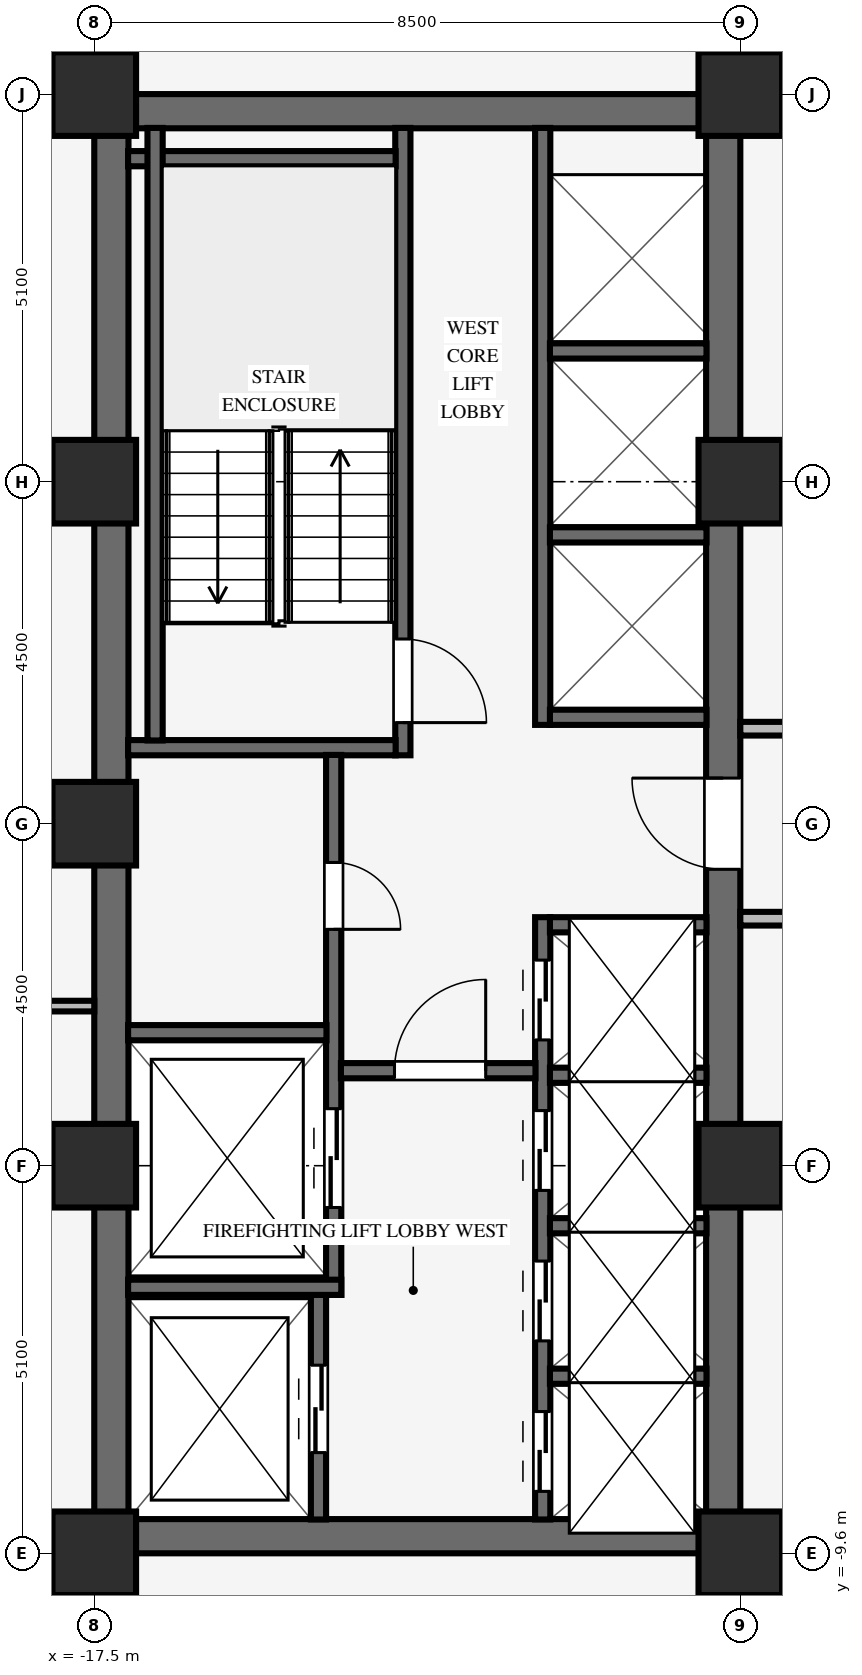
"""IFC4 building model, lengths in metres.
Left out: names, types, materials, properties, quantities, classifications, styles, units other than length and angle.
Written with IfcOpenShell. Run it as: python <this file> out.ifc"""

import sys

from ifc_helpers import new_model, si_unit, direction, frame, frame_2d, origin, origin_2d, place, context, subcontext, project, spatial, rectangle, extrude, source, transform, mapped, element, fill, save


model = new_model("IFC4")
c1 = context("Model", 3, precision=1e-05, world=origin(), true_north=direction((0.0, 1.0)))
c2 = subcontext(c1, "Body", "Model", "MODEL_VIEW")
j1 = project(units=[si_unit("LENGTHUNIT", "METRE"), si_unit("PLANEANGLEUNIT", "RADIAN")], contexts=[c1])
p1 = place(None, origin())
s1 = spatial("IfcSite", under=j1, at=p1, CompositionType="ELEMENT")
p2 = place(p1, origin())
s2 = spatial("IfcBuilding", under=s1, at=p2, CompositionType="ELEMENT")
p3 = place(p2, frame((0.0, 0.0, 75.05)))
s3 = spatial("IfcBuildingStorey", under=s2, at=p3, CompositionType="ELEMENT", Elevation=75.05)
for number, where, z_axis, x_axis in (
    (1, (-17.5, -9.375, 0.0), (0.0, 0.0, 1.0), (1.0, 0.0, 0.0)),
    (2, (-17.5, 9.375, 0.0), (0.0, 0.0, 1.0), (1.0, 0.0, 0.0)),
):
    element("IfcWall", number, at=place(p3, frame(where, z_axis=z_axis, x_axis=x_axis)), inside=s3, PredefinedType="SHEAR", context=c2, shape_type="SweptSolid", body=[
        extrude(rectangle(XDim=8.5, YDim=0.45, at=frame_2d((4.25, 0.0))), origin(), (0.0, 0.0, 1.0), 3.37),
    ])
p4 = place(p3, frame((-17.275, -9.155, 0.0), z_axis=(0.0, 0.0, 1.0), x_axis=(0.0, 1.0, 0.0)))
e3 = element("IfcWall", 3, at=p4, inside=s3, PredefinedType="SHEAR", context=c2, shape_type="SweptSolid", body=[
    extrude(rectangle(XDim=18.31, YDim=0.45, at=frame_2d((9.155, 0.0))), origin(), (0.0, 0.0, 1.0), 3.37),
])
p5 = place(p3, frame((-9.225, -9.155, 0.0), z_axis=(0.0, 0.0, 1.0), x_axis=(0.0, 1.0, 0.0)))
e4 = element("IfcWall", 4, at=p5, inside=s3, PredefinedType="SHEAR", context=c2, shape_type="SweptSolid", body=[
    extrude(rectangle(XDim=18.31, YDim=0.45, at=frame_2d((9.155, 0.0))), origin(), (0.0, 0.0, 1.0), 3.37),
])
p6 = place(p5, frame((8.555, 0.0, 0.0)))
e5 = element("IfcOpeningElement", 5, at=p6, cuts=e4, PredefinedType="OPENING", context=c2, shape_type="SweptSolid", body=[
    extrude(rectangle(XDim=1.2, YDim=2.15, at=frame_2d((0.6, 1.075))), frame((0.0, 0.235, 0.0), z_axis=(0.0, -1.0, 0.0), x_axis=(1.0, 0.0, 0.0)), (0.0, 0.0, 1.0), 0.47),
])
for number, where, z_axis, x_axis in (
    (6, (-17.5, -9.6, 0.0), (0.0, 0.0, 1.0), (1.0, 0.0, 0.0)),
    (7, (-17.5, -4.5, 0.0), (0.0, 0.0, 1.0), (1.0, 0.0, 0.0)),
    (8, (-17.5, 4.5, 0.0), (0.0, 0.0, 1.0), (1.0, 0.0, 0.0)),
    (9, (-17.5, 9.6, 0.0), (0.0, 0.0, 1.0), (1.0, 0.0, 0.0)),
    (10, (-9.0, -9.6, 0.0), (0.0, 0.0, 1.0), (1.0, 0.0, 0.0)),
    (11, (-9.0, -4.5, 0.0), (0.0, 0.0, 1.0), (1.0, 0.0, 0.0)),
    (12, (-9.0, 4.5, 0.0), (0.0, 0.0, 1.0), (1.0, 0.0, 0.0)),
    (13, (-9.0, 9.6, 0.0), (0.0, 0.0, 1.0), (1.0, 0.0, 0.0)),
    (14, (-17.5, 0.0, 0.0), (0.0, 0.0, 1.0), (1.0, 0.0, 0.0)),
):
    element("IfcColumn", number, at=place(p3, frame(where, z_axis=z_axis, x_axis=x_axis)), inside=s3, PredefinedType="COLUMN", context=c2, shape_type="SweptSolid", body=[
        extrude(rectangle(XDim=1.1, YDim=1.1, at=origin_2d()), origin(), (0.0, 0.0, 1.0), 3.37),
    ])
p7 = place(p3, frame((-13.44, 0.9, 0.0), z_axis=(0.0, 0.0, 1.0), x_axis=(0.0, 1.0, 0.0)))
e15 = element("IfcWall", 15, at=p7, inside=s3, PredefinedType="SHEAR", context=c2, shape_type="SweptSolid", body=[
    extrude(rectangle(XDim=8.255, YDim=0.2, at=frame_2d((4.127, 0.0))), origin(), (0.0, 0.0, 1.0), 3.37),
])
p8 = place(p7, frame((1.53, 0.0, 0.0), z_axis=(0.0, 0.0, 1.0), x_axis=(-1.0, 0.0, 0.0)))
e16 = element("IfcOpeningElement", 16, at=p8, cuts=e15, PredefinedType="OPENING", context=c2, shape_type="SweptSolid", body=[
    extrude(rectangle(XDim=1.1, YDim=2.15, at=frame_2d((0.55, 1.075))), frame((0.0, 0.11, 0.0), z_axis=(0.0, -1.0, 0.0), x_axis=(1.0, 0.0, 0.0)), (0.0, 0.0, 1.0), 0.22),
])
for number, where, z_axis, x_axis in (
    (17, (-17.055, 1.0, 0.0), (0.0, 0.0, 1.0), (1.0, 0.0, 0.0)),
    (18, (-17.055, 8.75, 0.0), (0.0, 0.0, 1.0), (1.0, 0.0, 0.0)),
):
    element("IfcWall", number, at=place(p3, frame(where, z_axis=z_axis, x_axis=x_axis)), inside=s3, PredefinedType="SHEAR", context=c2, shape_type="SweptSolid", body=[
        extrude(rectangle(XDim=3.52, YDim=0.2, at=frame_2d((1.76, 0.0))), origin(), (0.0, 0.0, 1.0), 3.37),
    ])
p9 = place(p3, frame((-16.7, 1.095, 0.0), z_axis=(0.0, 0.0, 1.0), x_axis=(0.0, 1.0, 0.0)))
e19 = element("IfcWall", 19, at=p9, inside=s3, PredefinedType="SHEAR", context=c2, shape_type="SweptSolid", body=[
    extrude(rectangle(XDim=8.06, YDim=0.2, at=frame_2d((4.03, 0.0))), origin(), (0.0, 0.0, 1.0), 3.37),
])
p10 = place(p3, frame((-14.55, -9.155, 0.0), z_axis=(0.0, 0.0, 1.0), x_axis=(0.0, 1.0, 0.0)))
e20 = element("IfcWall", 20, at=p10, inside=s3, PredefinedType="SHEAR", context=c2, shape_type="SweptSolid", body=[
    extrude(rectangle(XDim=2.96, YDim=0.2, at=frame_2d((1.48, 0.0))), origin(), (0.0, 0.0, 1.0), 3.37),
])
p11 = place(p10, frame((0.88, 0.0, 0.0)))
e21 = element("IfcOpeningElement", 21, at=p11, cuts=e20, PredefinedType="OPENING", context=c2, shape_type="SweptSolid", body=[
    extrude(rectangle(XDim=1.15, YDim=2.15, at=frame_2d((0.575, 1.075))), frame((0.0, 0.11, 0.0), z_axis=(0.0, -1.0, 0.0), x_axis=(1.0, 0.0, 0.0)), (0.0, 0.0, 1.0), 0.22),
])
p12 = place(p3, frame((-14.35, -6.2, 0.0), z_axis=(0.0, 0.0, 1.0), x_axis=(0.0, 1.0, 0.0)))
e22 = element("IfcWall", 22, at=p12, inside=s3, PredefinedType="SHEAR", context=c2, shape_type="SweptSolid", body=[
    extrude(rectangle(XDim=7.105, YDim=0.2, at=frame_2d((3.552, 0.0))), origin(), (0.0, 0.0, 1.0), 3.37),
])
p13 = place(p12, frame((5.69, 0.0, 0.0), z_axis=(0.0, 0.0, 1.0), x_axis=(-1.0, 0.0, 0.0)))
e23 = element("IfcOpeningElement", 23, at=p13, cuts=e22, PredefinedType="OPENING", context=c2, shape_type="SweptSolid", body=[
    extrude(rectangle(XDim=0.88, YDim=2.1, at=frame_2d((0.44, 1.05))), frame((0.0, 0.11, 0.0), z_axis=(0.0, -1.0, 0.0), x_axis=(1.0, 0.0, 0.0)), (0.0, 0.0, 1.0), 0.22),
])
p14 = place(p12, frame((1.15, 0.0, 0.0)))
e24 = element("IfcOpeningElement", 24, at=p14, cuts=e22, PredefinedType="OPENING", context=c2, shape_type="SweptSolid", body=[
    extrude(rectangle(XDim=1.3, YDim=2.2, at=frame_2d((0.65, 1.1))), frame((0.0, 0.11, 0.0), z_axis=(0.0, -1.0, 0.0), x_axis=(1.0, 0.0, 0.0)), (0.0, 0.0, 1.0), 0.22),
])
p15 = place(p3, frame((-17.055, -6.1, 0.0), z_axis=(0.0, 0.0, 1.0), x_axis=(1.0, 0.0, 0.0)))
e25 = element("IfcWall", 25, at=p15, inside=s3, PredefinedType="SHEAR", context=c2, shape_type="SweptSolid", body=[
    extrude(rectangle(XDim=2.805, YDim=0.2, at=frame_2d((1.402, 0.0))), origin(), (0.0, 0.0, 1.0), 3.37),
])
p16 = place(p3, frame((-17.055, -2.75, 0.0), z_axis=(0.0, 0.0, 1.0), x_axis=(1.0, 0.0, 0.0)))
e26 = element("IfcWall", 26, at=p16, inside=s3, PredefinedType="SHEAR", context=c2, shape_type="SweptSolid", body=[
    extrude(rectangle(XDim=2.61, YDim=0.2, at=frame_2d((1.305, 0.0))), origin(), (0.0, 0.0, 1.0), 3.37),
])
p17 = place(p3, frame((-11.6, -9.155, 0.0), z_axis=(0.0, 0.0, 1.0), x_axis=(0.0, 1.0, 0.0)))
e27 = element("IfcWall", 27, at=p17, inside=s3, PredefinedType="SHEAR", context=c2, shape_type="SweptSolid", body=[
    extrude(rectangle(XDim=7.925, YDim=0.2, at=frame_2d((3.962, 0.0))), origin(), (0.0, 0.0, 1.0), 3.37),
])
p18 = place(p17, frame((0.37, 0.0, 0.0)))
e28 = element("IfcOpeningElement", 28, at=p18, cuts=e27, PredefinedType="OPENING", context=c2, shape_type="SweptSolid", body=[
    extrude(rectangle(XDim=1.05, YDim=2.15, at=frame_2d((0.525, 1.075))), frame((0.0, 0.11, 0.0), z_axis=(0.0, -1.0, 0.0), x_axis=(1.0, 0.0, 0.0)), (0.0, 0.0, 1.0), 0.22),
])
p19 = place(p17, frame((2.35, 0.0, 0.0)))
e29 = element("IfcOpeningElement", 29, at=p19, cuts=e27, PredefinedType="OPENING", context=c2, shape_type="SweptSolid", body=[
    extrude(rectangle(XDim=1.05, YDim=2.15, at=frame_2d((0.525, 1.075))), frame((0.0, 0.11, 0.0), z_axis=(0.0, -1.0, 0.0), x_axis=(1.0, 0.0, 0.0)), (0.0, 0.0, 1.0), 0.22),
])
p20 = place(p17, frame((4.33, 0.0, 0.0)))
e30 = element("IfcOpeningElement", 30, at=p20, cuts=e27, PredefinedType="OPENING", context=c2, shape_type="SweptSolid", body=[
    extrude(rectangle(XDim=1.05, YDim=2.15, at=frame_2d((0.525, 1.075))), frame((0.0, 0.11, 0.0), z_axis=(0.0, -1.0, 0.0), x_axis=(1.0, 0.0, 0.0)), (0.0, 0.0, 1.0), 0.22),
])
p21 = place(p17, frame((6.31, 0.0, 0.0)))
e31 = element("IfcOpeningElement", 31, at=p21, cuts=e27, PredefinedType="OPENING", context=c2, shape_type="SweptSolid", body=[
    extrude(rectangle(XDim=1.05, YDim=2.15, at=frame_2d((0.525, 1.075))), frame((0.0, 0.11, 0.0), z_axis=(0.0, -1.0, 0.0), x_axis=(1.0, 0.0, 0.0)), (0.0, 0.0, 1.0), 0.22),
])
p22 = place(p3, frame((-14.255, -3.25, 0.0), z_axis=(0.0, 0.0, 1.0), x_axis=(1.0, 0.0, 0.0)))
e32 = element("IfcWall", 32, at=p22, inside=s3, PredefinedType="SHEAR", context=c2, shape_type="SweptSolid", body=[
    extrude(rectangle(XDim=2.56, YDim=0.2, at=frame_2d((1.28, 0.0))), origin(), (0.0, 0.0, 1.0), 3.37),
])
p23 = place(p22, frame((0.705, 0.0, 0.0)))
e33 = element("IfcOpeningElement", 33, at=p23, cuts=e32, PredefinedType="OPENING", context=c2, shape_type="SweptSolid", body=[
    extrude(rectangle(XDim=1.2, YDim=2.15, at=frame_2d((0.6, 1.075))), frame((0.0, 0.11, 0.0), z_axis=(0.0, -1.0, 0.0), x_axis=(1.0, 0.0, 0.0)), (0.0, 0.0, 1.0), 0.22),
])
for number, where, z_axis, x_axis in (
    (34, (-11.505, -7.27, 0.0), (0.0, 0.0, 1.0), (1.0, 0.0, 0.0)),
    (35, (-11.505, -5.29, 0.0), (0.0, 0.0, 1.0), (1.0, 0.0, 0.0)),
    (36, (-11.505, -3.31, 0.0), (0.0, 0.0, 1.0), (1.0, 0.0, 0.0)),
    (37, (-11.505, -1.33, 0.0), (0.0, 0.0, 1.0), (1.0, 0.0, 0.0)),
):
    element("IfcWall", number, at=place(p3, frame(where, z_axis=z_axis, x_axis=x_axis)), inside=s3, PredefinedType="SHEAR", context=c2, shape_type="SweptSolid", body=[
        extrude(rectangle(XDim=2.06, YDim=0.2, at=frame_2d((1.03, 0.0))), origin(), (0.0, 0.0, 1.0), 3.37),
    ])
p24 = place(p3, frame((-11.6, 1.3, 0.0), z_axis=(0.0, 0.0, 1.0), x_axis=(0.0, 1.0, 0.0)))
e38 = element("IfcWall", 38, at=p24, inside=s3, PredefinedType="SHEAR", context=c2, shape_type="SweptSolid", body=[
    extrude(rectangle(XDim=7.855, YDim=0.2, at=frame_2d((3.927, 0.0))), origin(), (0.0, 0.0, 1.0), 3.37),
])
for number, where, z_axis, x_axis in (
    (39, (-11.505, 1.4, 0.0), (0.0, 0.0, 1.0), (1.0, 0.0, 0.0)),
    (40, (-11.505, 3.8, 0.0), (0.0, 0.0, 1.0), (1.0, 0.0, 0.0)),
    (41, (-11.505, 6.22, 0.0), (0.0, 0.0, 1.0), (1.0, 0.0, 0.0)),
):
    element("IfcWall", number, at=place(p3, frame(where, z_axis=z_axis, x_axis=x_axis)), inside=s3, PredefinedType="SHEAR", context=c2, shape_type="SweptSolid", body=[
        extrude(rectangle(XDim=2.06, YDim=0.2, at=frame_2d((1.03, 0.0))), origin(), (0.0, 0.0, 1.0), 3.37),
    ])
p25 = place(p3, frame((-8.454, -9.6, 0.0), z_axis=(0.0, 0.0, 1.0), x_axis=(1.0, 0.0, 0.0)))
e42 = element("IfcWall", 42, at=p25, inside=s3, PredefinedType="PARTITIONING", context=c2, shape_type="SweptSolid", body=[
    extrude(rectangle(XDim=5.254, YDim=0.18, at=frame_2d((2.627, 0.0))), origin(), (0.0, 0.0, 1.0), 2.405),
])
p26 = place(p3, frame((-21.16, -2.4, 0.0), z_axis=(0.0, 0.0, 1.0), x_axis=(1.0, 0.0, 0.0)))
e43 = element("IfcWall", 43, at=p26, inside=s3, PredefinedType="PARTITIONING", context=c2, shape_type="SweptSolid", body=[
    extrude(rectangle(XDim=3.66, YDim=0.14, at=frame_2d((1.83, 0.0))), origin(), (0.0, 0.0, 1.0), 3.36),
])
p27 = place(p3, frame((-9.0, -1.25, 0.0), z_axis=(0.0, 0.0, 1.0), x_axis=(1.0, 0.0, 0.0)))
e44 = element("IfcWall", 44, at=p27, inside=s3, PredefinedType="PARTITIONING", context=c2, shape_type="SweptSolid", body=[
    extrude(rectangle(XDim=5.8, YDim=0.18, at=frame_2d((2.9, 0.0))), origin(), (0.0, 0.0, 1.0), 3.36),
])
p28 = place(p3, frame((-9.0, 1.25, 0.0), z_axis=(0.0, 0.0, 1.0), x_axis=(1.0, 0.0, 0.0)))
e45 = element("IfcWall", 45, at=p28, inside=s3, PredefinedType="PARTITIONING", context=c2, shape_type="SweptSolid", body=[
    extrude(rectangle(XDim=5.8, YDim=0.18, at=frame_2d((2.9, 0.0))), origin(), (0.0, 0.0, 1.0), 3.36),
])
p29 = place(p28, frame((2.42, 0.0, 0.0)))
e46 = element("IfcOpeningElement", 46, at=p29, cuts=e45, PredefinedType="OPENING", context=c2, shape_type="SweptSolid", body=[
    extrude(rectangle(XDim=0.96, YDim=2.1, at=frame_2d((0.48, 1.05))), frame((0.0, 0.1, 0.0), z_axis=(0.0, -1.0, 0.0), x_axis=(1.0, 0.0, 0.0)), (0.0, 0.0, 1.0), 0.2),
])
p30 = place(p3, frame((-8.454, 4.8, 0.0), z_axis=(0.0, 0.0, 1.0), x_axis=(1.0, 0.0, 0.0)))
e47 = element("IfcWall", 47, at=p30, inside=s3, PredefinedType="PARTITIONING", context=c2, shape_type="SweptSolid", body=[
    extrude(rectangle(XDim=5.168, YDim=0.13, at=frame_2d((2.584, 0.0))), origin(), (0.0, 0.0, 1.0), 2.738),
])
p31 = place(p3, frame((-8.454, 9.6, 0.0), z_axis=(0.0, 0.0, 1.0), x_axis=(1.0, 0.0, 0.0)))
e48 = element("IfcWall", 48, at=p31, inside=s3, PredefinedType="PARTITIONING", context=c2, shape_type="SweptSolid", body=[
    extrude(rectangle(XDim=5.254, YDim=0.18, at=frame_2d((2.627, 0.0))), origin(), (0.0, 0.0, 1.0), 2.405),
])
p32 = place(p31, frame((2.147, 0.0, 0.0)))
e49 = element("IfcOpeningElement", 49, at=p32, cuts=e48, PredefinedType="OPENING", context=c2, shape_type="SweptSolid", body=[
    extrude(rectangle(XDim=0.96, YDim=2.1, at=frame_2d((0.48, 1.05))), frame((0.0, 0.1, 0.0), z_axis=(0.0, -1.0, 0.0), x_axis=(1.0, 0.0, 0.0)), (0.0, 0.0, 1.0), 0.2),
])
for number, where, z_axis, x_axis in (
    (50, (-17.5, -11.114, 0.0), (0.0, 0.0, 1.0), (0.0, 1.0, 0.0)),
    (51, (-17.5, 10.146, 0.0), (0.0, 0.0, 1.0), (0.0, 1.0, 0.0)),
):
    element("IfcWall", number, at=place(p3, frame(where, z_axis=z_axis, x_axis=x_axis)), inside=s3, PredefinedType="PARTITIONING", context=c2, shape_type="SweptSolid", body=[
        extrude(rectangle(XDim=0.968, YDim=0.18, at=frame_2d((0.484, 0.0))), origin(), (0.0, 0.0, 1.0), 2.738),
    ])
m1 = source(origin(), c2, "Body", "SweptSolid", [
    extrude(rectangle(XDim=1.1, YDim=2.15, at=frame_2d((0.55, 1.075))), frame((0.0, 0.025, 0.0), z_axis=(0.0, -1.0, 0.0), x_axis=(1.0, 0.0, 0.0)), (0.0, 0.0, 1.0), 0.05),
])
p33 = place(p8, origin())
e52 = element("IfcDoor", 52, at=p33, inside=s3, OperationType="SINGLE_SWING_RIGHT", PredefinedType="DOOR", context=c2, shape_type="MappedRepresentation", body=[
    mapped(m1, transform((0.0, 0.0, 0.0), scale=1.0)),
])
fill(e16, e52)
m2 = source(origin(), c2, "Body", "SweptSolid", [
    extrude(rectangle(XDim=0.88, YDim=2.1, at=frame_2d((0.44, 1.05))), frame((0.0, 0.025, 0.0), z_axis=(0.0, -1.0, 0.0), x_axis=(1.0, 0.0, 0.0)), (0.0, 0.0, 1.0), 0.05),
])
p34 = place(p13, origin())
e53 = element("IfcDoor", 53, at=p34, inside=s3, OperationType="SINGLE_SWING_RIGHT", PredefinedType="DOOR", context=c2, shape_type="MappedRepresentation", body=[
    mapped(m2, transform((0.0, 0.0, 0.0), scale=1.0)),
])
fill(e23, e53)
m3 = source(origin(), c2, "Body", "SweptSolid", [
    extrude(rectangle(XDim=1.2, YDim=2.15, at=frame_2d((0.6, 1.075))), frame((0.0, 0.025, 0.0), z_axis=(0.0, -1.0, 0.0), x_axis=(1.0, 0.0, 0.0)), (0.0, 0.0, 1.0), 0.05),
])
p35 = place(p23, origin())
e54 = element("IfcDoor", 54, at=p35, inside=s3, OperationType="SINGLE_SWING_RIGHT", PredefinedType="DOOR", context=c2, shape_type="MappedRepresentation", body=[
    mapped(m3, transform((0.0, 0.0, 0.0), scale=1.0)),
])
fill(e33, e54)
p36 = place(p6, origin())
e55 = element("IfcDoor", 55, at=p36, inside=s3, OperationType="SINGLE_SWING_RIGHT", PredefinedType="DOOR", context=c2, shape_type="MappedRepresentation", body=[
    mapped(m3, transform((0.0, 0.0, 0.0), scale=1.0)),
])
fill(e5, e55)
m4 = source(origin(), c2, "Body", "SweptSolid", [
    extrude(rectangle(XDim=1.15, YDim=2.15, at=frame_2d((0.575, 1.075))), frame((0.0, 0.025, 0.0), z_axis=(0.0, -1.0, 0.0), x_axis=(1.0, 0.0, 0.0)), (0.0, 0.0, 1.0), 0.05),
])
p37 = place(p11, origin())
e56 = element("IfcDoor", 56, at=p37, inside=s3, OperationType="DOUBLE_DOOR_SLIDING", PredefinedType="DOOR", context=c2, shape_type="MappedRepresentation", body=[
    mapped(m4, transform((0.0, 0.0, 0.0), scale=1.0)),
])
fill(e21, e56)
m5 = source(origin(), c2, "Body", "SweptSolid", [
    extrude(rectangle(XDim=1.3, YDim=2.2, at=frame_2d((0.65, 1.1))), frame((0.0, 0.025, 0.0), z_axis=(0.0, -1.0, 0.0), x_axis=(1.0, 0.0, 0.0)), (0.0, 0.0, 1.0), 0.05),
])
p38 = place(p14, origin())
e57 = element("IfcDoor", 57, at=p38, inside=s3, OperationType="DOUBLE_DOOR_SLIDING", PredefinedType="DOOR", context=c2, shape_type="MappedRepresentation", body=[
    mapped(m5, transform((0.0, 0.0, 0.0), scale=1.0)),
])
fill(e24, e57)
m6 = source(origin(), c2, "Body", "SweptSolid", [
    extrude(rectangle(XDim=1.05, YDim=2.15, at=frame_2d((0.525, 1.075))), frame((0.0, 0.025, 0.0), z_axis=(0.0, -1.0, 0.0), x_axis=(1.0, 0.0, 0.0)), (0.0, 0.0, 1.0), 0.05),
])
p39 = place(p18, origin())
e58 = element("IfcDoor", 58, at=p39, inside=s3, OperationType="DOUBLE_DOOR_SLIDING", PredefinedType="DOOR", context=c2, shape_type="MappedRepresentation", body=[
    mapped(m6, transform((0.0, 0.0, 0.0), scale=1.0)),
])
fill(e28, e58)
p40 = place(p19, origin())
e59 = element("IfcDoor", 59, at=p40, inside=s3, OperationType="DOUBLE_DOOR_SLIDING", PredefinedType="DOOR", context=c2, shape_type="MappedRepresentation", body=[
    mapped(m6, transform((0.0, 0.0, 0.0), scale=1.0)),
])
fill(e29, e59)
p41 = place(p20, origin())
e60 = element("IfcDoor", 60, at=p41, inside=s3, OperationType="DOUBLE_DOOR_SLIDING", PredefinedType="DOOR", context=c2, shape_type="MappedRepresentation", body=[
    mapped(m6, transform((0.0, 0.0, 0.0), scale=1.0)),
])
fill(e30, e60)
p42 = place(p21, origin())
e61 = element("IfcDoor", 61, at=p42, inside=s3, OperationType="DOUBLE_DOOR_SLIDING", PredefinedType="DOOR", context=c2, shape_type="MappedRepresentation", body=[
    mapped(m6, transform((0.0, 0.0, 0.0), scale=1.0)),
])
fill(e31, e61)
save(model, sys.argv[1])
